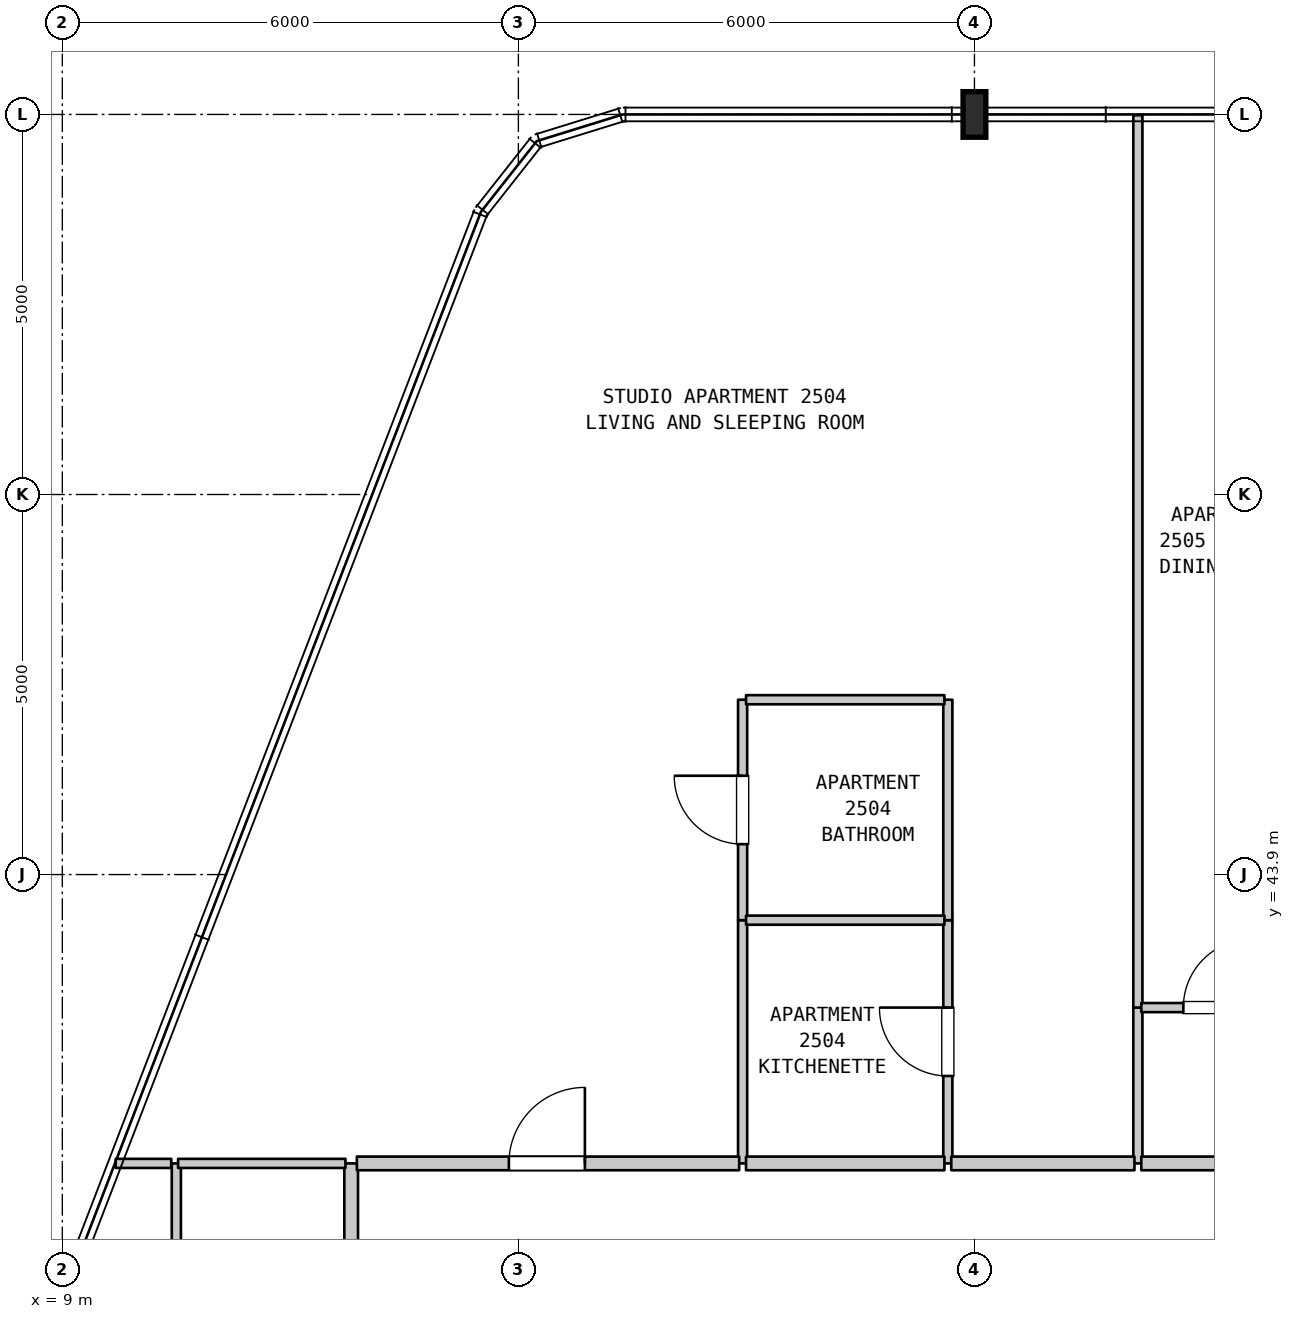
"""IFC4 building model, lengths in metres.
Left out: names, types, materials, properties, quantities, classifications, styles, units other than length and angle.
Written with IfcOpenShell. Run it as: python <this file> out.ifc"""

import sys

from ifc_helpers import new_model, si_unit, direction, frame, frame_2d, origin, origin_2d, place, context, subcontext, project, spatial, rectangle, i_section, extrude, element, fill, save


model = new_model("IFC4")
c1 = context("Model", 3, precision=1e-05, world=origin(), true_north=direction((0.0, 1.0)))
c2 = subcontext(c1, "Body", "Model", "MODEL_VIEW")
j1 = project(units=[si_unit("LENGTHUNIT", "METRE"), si_unit("PLANEANGLEUNIT", "RADIAN")], contexts=[c1])
p1 = place(None, origin())
s1 = spatial("IfcSite", under=j1, at=p1, CompositionType="ELEMENT")
p2 = place(p1, origin())
s2 = spatial("IfcBuilding", under=s1, at=p2, CompositionType="ELEMENT")
p3 = place(p2, frame((0.0, 0.0, 105.7)))
s3 = spatial("IfcBuildingStorey", under=s2, at=p3, CompositionType="ELEMENT", Elevation=105.7)
p4 = place(p3, frame((21.0, 53.9, 0.0), z_axis=(0.0, 0.0, 1.0), x_axis=(1.0, 0.0, 0.0)))
e1 = element("IfcColumn", 1, at=p4, inside=s3, PredefinedType="COLUMN", context=c2, shape_type="SweptSolid", body=[
    extrude(i_section(OverallWidth=0.3, OverallDepth=0.6, WebThickness=0.015, FlangeThickness=0.03, FilletRadius=0.027, at=origin_2d()), origin(), (0.0, 0.0, 1.0), 3.7),
])
p5 = place(p3, frame((10.5, 31.45, 0.0), z_axis=(0.0, 0.0, 1.0), x_axis=(0.0, 1.0, 0.0)))
e2 = element("IfcWall", 2, at=p5, inside=s3, PredefinedType="PARTITIONING", context=c2, shape_type="SweptSolid", body=[
    extrude(rectangle(XDim=8.65, YDim=0.12, at=frame_2d((4.325, 0.0))), origin(), (0.0, 0.0, 1.0), 3.385),
])
p6 = place(p3, frame((12.8, 31.45, 0.0), z_axis=(0.0, 0.0, 1.0), x_axis=(0.0, 1.0, 0.0)))
e3 = element("IfcWall", 3, at=p6, inside=s3, PredefinedType="STANDARD", context=c2, shape_type="SweptSolid", body=[
    extrude(rectangle(XDim=8.65, YDim=0.18, at=frame_2d((4.325, 0.0))), origin(), (0.0, 0.0, 1.0), 3.385),
])
p7 = place(p3, frame((17.95, 40.1, 0.0), z_axis=(0.0, 0.0, 1.0), x_axis=(0.0, 1.0, 0.0)))
e4 = element("IfcWall", 4, at=p7, inside=s3, PredefinedType="PARTITIONING", context=c2, shape_type="SweptSolid", body=[
    extrude(rectangle(XDim=3.2, YDim=0.12, at=frame_2d((1.6, 0.0))), origin(), (0.0, 0.0, 1.0), 3.385),
])
p8 = place(p3, frame((17.95, 43.3, 0.0), z_axis=(0.0, 0.0, 1.0), x_axis=(0.0, 1.0, 0.0)))
e5 = element("IfcWall", 5, at=p8, inside=s3, PredefinedType="PARTITIONING", context=c2, shape_type="SweptSolid", body=[
    extrude(rectangle(XDim=2.9, YDim=0.12, at=frame_2d((1.45, 0.0))), origin(), (0.0, 0.0, 1.0), 3.385),
])
p9 = place(p8, frame((1.0, 0.0, 0.0)))
e6 = element("IfcOpeningElement", 6, at=p9, cuts=e5, PredefinedType="OPENING", context=c2, shape_type="SweptSolid", body=[
    extrude(rectangle(XDim=0.9, YDim=2.1, at=frame_2d((0.45, 1.05))), frame((0.0, 0.07, 0.0), z_axis=(0.0, -1.0, 0.0), x_axis=(1.0, 0.0, 0.0)), (0.0, 0.0, 1.0), 0.14),
])
p10 = place(p3, frame((20.65, 40.1, 0.0), z_axis=(0.0, 0.0, 1.0), x_axis=(0.0, 1.0, 0.0)))
e7 = element("IfcWall", 7, at=p10, inside=s3, PredefinedType="PARTITIONING", context=c2, shape_type="SweptSolid", body=[
    extrude(rectangle(XDim=3.2, YDim=0.12, at=frame_2d((1.6, 0.0))), origin(), (0.0, 0.0, 1.0), 3.385),
])
p11 = place(p10, frame((1.15, 0.0, 0.0)))
e8 = element("IfcOpeningElement", 8, at=p11, cuts=e7, PredefinedType="OPENING", context=c2, shape_type="SweptSolid", body=[
    extrude(rectangle(XDim=0.9, YDim=2.15, at=frame_2d((0.45, 1.075))), frame((0.0, 0.07, 0.0), z_axis=(0.0, -1.0, 0.0), x_axis=(1.0, 0.0, 0.0)), (0.0, 0.0, 1.0), 0.14),
])
p12 = place(p3, frame((20.65, 43.3, 0.0), z_axis=(0.0, 0.0, 1.0), x_axis=(0.0, 1.0, 0.0)))
e9 = element("IfcWall", 9, at=p12, inside=s3, PredefinedType="PARTITIONING", context=c2, shape_type="SweptSolid", body=[
    extrude(rectangle(XDim=2.9, YDim=0.12, at=frame_2d((1.45, 0.0))), origin(), (0.0, 0.0, 1.0), 3.385),
])
p13 = place(p3, frame((23.15, 40.1, 0.0), z_axis=(0.0, 0.0, 1.0), x_axis=(0.0, 1.0, 0.0)))
e10 = element("IfcWall", 10, at=p13, inside=s3, PredefinedType="PARTITIONING", context=c2, shape_type="SweptSolid", body=[
    extrude(rectangle(XDim=2.05, YDim=0.12, at=frame_2d((1.025, 0.0))), origin(), (0.0, 0.0, 1.0), 3.385),
])
p14 = place(p3, frame((23.15, 42.15, 0.0), z_axis=(0.0, 0.0, 1.0), x_axis=(0.0, 1.0, 0.0)))
e11 = element("IfcWall", 11, at=p14, inside=s3, PredefinedType="PARTITIONING", context=c2, shape_type="SweptSolid", body=[
    extrude(rectangle(XDim=11.74, YDim=0.12, at=frame_2d((5.87, 0.0))), origin(), (0.0, 0.0, 1.0), 3.385),
])
p15 = place(p3, frame((9.702, 40.1, 0.0), z_axis=(0.0, 0.0, 1.0), x_axis=(1.0, 0.0, 0.0)))
e12 = element("IfcWall", 12, at=p15, inside=s3, PredefinedType="PARTITIONING", context=c2, shape_type="SweptSolid", body=[
    extrude(rectangle(XDim=0.731, YDim=0.12, at=frame_2d((0.366, 0.0))), origin(), (0.0, 0.0, 1.0), 3.385),
])
p16 = place(p3, frame((10.523, 40.1, 0.0), z_axis=(0.0, 0.0, 1.0), x_axis=(1.0, 0.0, 0.0)))
e13 = element("IfcWall", 13, at=p16, inside=s3, PredefinedType="PARTITIONING", context=c2, shape_type="SweptSolid", body=[
    extrude(rectangle(XDim=2.202, YDim=0.12, at=frame_2d((1.101, 0.0))), origin(), (0.0, 0.0, 1.0), 3.385),
])
p17 = place(p3, frame((12.875, 40.1, 0.0), z_axis=(0.0, 0.0, 1.0), x_axis=(1.0, 0.0, 0.0)))
e14 = element("IfcWall", 14, at=p17, inside=s3, PredefinedType="STANDARD", context=c2, shape_type="SweptSolid", body=[
    extrude(rectangle(XDim=5.03, YDim=0.18, at=frame_2d((2.515, 0.0))), origin(), (0.0, 0.0, 1.0), 3.385),
])
p18 = place(p17, frame((2.0, 0.0, 0.0)))
e15 = element("IfcOpeningElement", 15, at=p18, cuts=e14, PredefinedType="OPENING", context=c2, shape_type="SweptSolid", body=[
    extrude(rectangle(XDim=1.0, YDim=2.15, at=frame_2d((0.5, 1.075))), frame((0.0, 0.1, 0.0), z_axis=(0.0, -1.0, 0.0), x_axis=(1.0, 0.0, 0.0)), (0.0, 0.0, 1.0), 0.2),
])
p19 = place(p3, frame((17.995, 40.1, 0.0), z_axis=(0.0, 0.0, 1.0), x_axis=(1.0, 0.0, 0.0)))
e16 = element("IfcWall", 16, at=p19, inside=s3, PredefinedType="STANDARD", context=c2, shape_type="SweptSolid", body=[
    extrude(rectangle(XDim=2.61, YDim=0.18, at=frame_2d((1.305, 0.0))), origin(), (0.0, 0.0, 1.0), 3.385),
])
p20 = place(p3, frame((20.695, 40.1, 0.0), z_axis=(0.0, 0.0, 1.0), x_axis=(1.0, 0.0, 0.0)))
e17 = element("IfcWall", 17, at=p20, inside=s3, PredefinedType="STANDARD", context=c2, shape_type="SweptSolid", body=[
    extrude(rectangle(XDim=2.41, YDim=0.18, at=frame_2d((1.205, 0.0))), origin(), (0.0, 0.0, 1.0), 3.385),
])
p21 = place(p3, frame((23.195, 40.1, 0.0), z_axis=(0.0, 0.0, 1.0), x_axis=(1.0, 0.0, 0.0)))
e18 = element("IfcWall", 18, at=p21, inside=s3, PredefinedType="STANDARD", context=c2, shape_type="SweptSolid", body=[
    extrude(rectangle(XDim=5.04, YDim=0.18, at=frame_2d((2.52, 0.0))), origin(), (0.0, 0.0, 1.0), 3.385),
])
p22 = place(p21, frame((1.75, 0.0, 0.0)))
e19 = element("IfcOpeningElement", 19, at=p22, cuts=e18, PredefinedType="OPENING", context=c2, shape_type="SweptSolid", body=[
    extrude(rectangle(XDim=1.0, YDim=2.15, at=frame_2d((0.5, 1.075))), frame((0.0, 0.1, 0.0), z_axis=(0.0, -1.0, 0.0), x_axis=(1.0, 0.0, 0.0)), (0.0, 0.0, 1.0), 0.2),
])
p23 = place(p3, frame((23.195, 42.15, 0.0), z_axis=(0.0, 0.0, 1.0), x_axis=(1.0, 0.0, 0.0)))
e20 = element("IfcWall", 20, at=p23, inside=s3, PredefinedType="PARTITIONING", context=c2, shape_type="SweptSolid", body=[
    extrude(rectangle(XDim=2.16, YDim=0.12, at=frame_2d((1.08, 0.0))), origin(), (0.0, 0.0, 1.0), 3.385),
])
p24 = place(p23, frame((0.553, 0.0, 0.0)))
e21 = element("IfcOpeningElement", 21, at=p24, cuts=e20, PredefinedType="OPENING", context=c2, shape_type="SweptSolid", body=[
    extrude(rectangle(XDim=0.9, YDim=2.15, at=frame_2d((0.45, 1.075))), frame((0.0, 0.07, 0.0), z_axis=(0.0, -1.0, 0.0), x_axis=(1.0, 0.0, 0.0)), (0.0, 0.0, 1.0), 0.14),
])
for number, where, z_axis, x_axis in (
    (22, (17.995, 43.3, 0.0), (0.0, 0.0, 1.0), (1.0, 0.0, 0.0)),
    (23, (17.995, 46.2, 0.0), (0.0, 0.0, 1.0), (1.0, 0.0, 0.0)),
):
    element("IfcWall", number, at=place(p3, frame(where, z_axis=z_axis, x_axis=x_axis)), inside=s3, PredefinedType="PARTITIONING", context=c2, shape_type="SweptSolid", body=[
        extrude(rectangle(XDim=2.61, YDim=0.12, at=frame_2d((1.305, 0.0))), origin(), (0.0, 0.0, 1.0), 3.385),
    ])
p25 = place(p9, origin())
e24 = element("IfcDoor", 24, at=p25, inside=s3, OperationType="SINGLE_SWING_RIGHT", PredefinedType="DOOR", context=c2, shape_type="SweptSolid", body=[
    extrude(rectangle(XDim=0.9, YDim=2.1, at=frame_2d((0.45, 1.05))), frame((0.0, 0.025, 0.0), z_axis=(0.0, -1.0, 0.0), x_axis=(1.0, 0.0, 0.0)), (0.0, 0.0, 1.0), 0.05),
])
fill(e6, e24)
p26 = place(p11, origin())
e25 = element("IfcDoor", 25, at=p26, inside=s3, OperationType="SINGLE_SWING_RIGHT", PredefinedType="DOOR", context=c2, shape_type="SweptSolid", body=[
    extrude(rectangle(XDim=0.9, YDim=2.15, at=frame_2d((0.45, 1.075))), frame((0.0, 0.025, 0.0), z_axis=(0.0, -1.0, 0.0), x_axis=(1.0, 0.0, 0.0)), (0.0, 0.0, 1.0), 0.05),
])
fill(e8, e25)
p27 = place(p18, origin())
e26 = element("IfcDoor", 26, at=p27, inside=s3, OperationType="SINGLE_SWING_RIGHT", PredefinedType="DOOR", context=c2, shape_type="SweptSolid", body=[
    extrude(rectangle(XDim=1.0, YDim=2.15, at=frame_2d((0.5, 1.075))), frame((0.0, 0.025, 0.0), z_axis=(0.0, -1.0, 0.0), x_axis=(1.0, 0.0, 0.0)), (0.0, 0.0, 1.0), 0.05),
])
fill(e15, e26)
p28 = place(p24, origin())
e27 = element("IfcDoor", 27, at=p28, inside=s3, OperationType="SINGLE_SWING_RIGHT", PredefinedType="DOOR", context=c2, shape_type="SweptSolid", body=[
    extrude(rectangle(XDim=0.9, YDim=2.15, at=frame_2d((0.45, 1.075))), frame((0.0, 0.025, 0.0), z_axis=(0.0, -1.0, 0.0), x_axis=(1.0, 0.0, 0.0)), (0.0, 0.0, 1.0), 0.05),
])
fill(e21, e27)
save(model, sys.argv[1])
